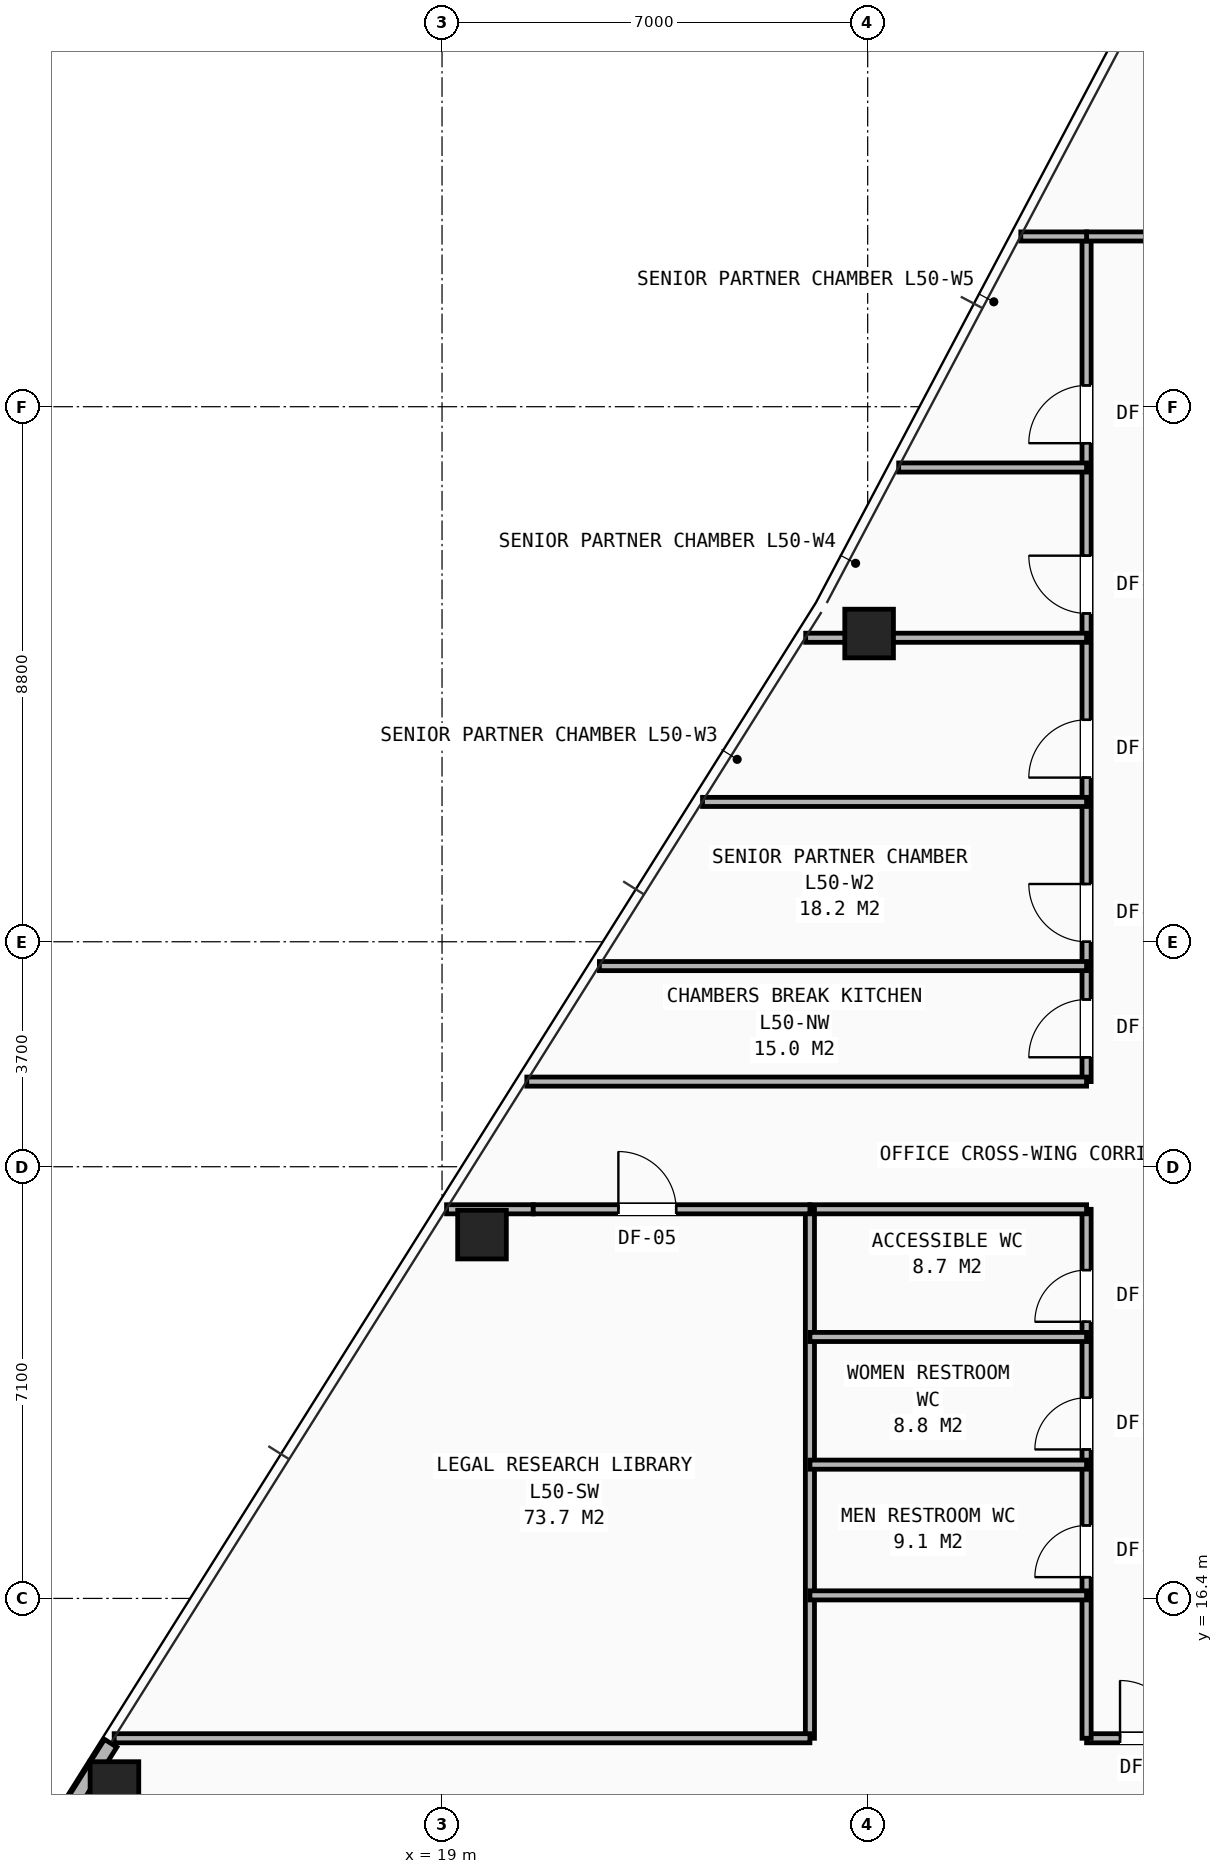
"""IFC4 building model, lengths in metres.
Left out: names, types, materials, properties, quantities, classifications, styles, units other than length and angle.
Written with IfcOpenShell. Run it as: python <this file> out.ifc"""

import sys

from ifc_helpers import new_model, si_unit, direction, frame, frame_2d, origin, origin_2d, place, context, subcontext, project, spatial, rectangle, hollow_rectangle, extrude, element, fill, save


model = new_model("IFC4")
c1 = context("Model", 3, precision=1e-05, world=origin(), true_north=direction((0.0, 1.0)))
c2 = subcontext(c1, "Body", "Model", "MODEL_VIEW")
j1 = project(units=[si_unit("LENGTHUNIT", "METRE"), si_unit("PLANEANGLEUNIT", "RADIAN")], contexts=[c1])
p1 = place(None, origin())
s1 = spatial("IfcSite", under=j1, at=p1, CompositionType="ELEMENT")
p2 = place(p1, origin())
s2 = spatial("IfcBuilding", under=s1, at=p2, CompositionType="ELEMENT")
p3 = place(p2, frame((0.0, 0.0, 175.8)))
s3 = spatial("IfcBuildingStorey", under=s2, at=p3, CompositionType="ELEMENT", Elevation=175.8)
for number, where, z_axis, x_axis in (
    (1, (26.024, 32.269, 0.0), (0.0, 0.0, 1.0), (1.0, 0.0, 0.0)),
    (2, (19.657, 22.384, 0.0), (0.0, 0.0, 1.0), (1.0, 0.0, 0.0)),
    (3, (13.612, 13.314, 0.0), (0.0, 0.0, 1.0), (1.0, 0.0, 0.0)),
):
    element("IfcColumn", number, at=place(p3, frame(where, z_axis=z_axis, x_axis=x_axis)), inside=s3, PredefinedType="COLUMN", context=c2, shape_type="SweptSolid", body=[
        extrude(hollow_rectangle(XDim=0.8, YDim=0.8, WallThickness=0.055, at=origin_2d()), origin(), (0.0, 0.0, 1.0), 3.45),
    ])
p4 = place(p3, frame((13.551, 14.018, 0.0), z_axis=(0.0, 0.0, 1.0), x_axis=(-0.531987132085, -0.846752438022, 0.0)))
e4 = element("IfcWall", 4, at=p4, inside=s3, PredefinedType="SHEAR", context=c2, shape_type="SweptSolid", body=[
    extrude(rectangle(XDim=1.302, YDim=0.24, at=frame_2d((0.651, 0.0))), origin(), (0.0, 0.0, 1.0), 2.583),
])
p5 = place(p3, frame((29.6, 14.1, 0.0), z_axis=(0.0, 0.0, 1.0), x_axis=(1.0, 0.0, 0.0)))
e5 = element("IfcWall", 5, at=p5, inside=s3, PredefinedType="PARTITIONING", context=c2, shape_type="SweptSolid", body=[
    extrude(rectangle(XDim=18.6, YDim=0.15, at=frame_2d((9.3, 0.0))), origin(), (0.0, 0.0, 1.0), 2.252),
])
p6 = place(p5, frame((0.55, 0.0, 0.0)))
e6 = element("IfcOpeningElement", 6, at=p6, cuts=e5, PredefinedType="OPENING", context=c2, shape_type="SweptSolid", body=[
    extrude(rectangle(XDim=0.95, YDim=2.1, at=frame_2d((0.475, 1.05))), frame((0.0, 0.085, 0.0), z_axis=(0.0, -1.0, 0.0), x_axis=(1.0, 0.0, 0.0)), (0.0, 0.0, 1.0), 0.17),
])
p7 = place(p5, frame((2.25, 0.0, 0.0)))
e7 = element("IfcOpeningElement", 7, at=p7, cuts=e5, PredefinedType="OPENING", context=c2, shape_type="SweptSolid", body=[
    extrude(rectangle(XDim=0.95, YDim=2.1, at=frame_2d((0.475, 1.05))), frame((0.0, 0.085, 0.0), z_axis=(0.0, -1.0, 0.0), x_axis=(1.0, 0.0, 0.0)), (0.0, 0.0, 1.0), 0.17),
])
p8 = place(p5, frame((5.95, 0.0, 0.0)))
e8 = element("IfcOpeningElement", 8, at=p8, cuts=e5, PredefinedType="OPENING", context=c2, shape_type="SweptSolid", body=[
    extrude(rectangle(XDim=0.95, YDim=2.1, at=frame_2d((0.475, 1.05))), frame((0.0, 0.085, 0.0), z_axis=(0.0, -1.0, 0.0), x_axis=(1.0, 0.0, 0.0)), (0.0, 0.0, 1.0), 0.17),
])
p9 = place(p5, frame((9.75, 0.0, 0.0)))
e9 = element("IfcOpeningElement", 9, at=p9, cuts=e5, PredefinedType="OPENING", context=c2, shape_type="SweptSolid", body=[
    extrude(rectangle(XDim=0.95, YDim=2.1, at=frame_2d((0.475, 1.05))), frame((0.0, 0.085, 0.0), z_axis=(0.0, -1.0, 0.0), x_axis=(1.0, 0.0, 0.0)), (0.0, 0.0, 1.0), 0.17),
])
p10 = place(p5, frame((13.55, 0.0, 0.0)))
e10 = element("IfcOpeningElement", 10, at=p10, cuts=e5, PredefinedType="OPENING", context=c2, shape_type="SweptSolid", body=[
    extrude(rectangle(XDim=0.95, YDim=2.1, at=frame_2d((0.475, 1.05))), frame((0.0, 0.085, 0.0), z_axis=(0.0, -1.0, 0.0), x_axis=(1.0, 0.0, 0.0)), (0.0, 0.0, 1.0), 0.17),
])
p11 = place(p5, frame((16.95, 0.0, 0.0)))
e11 = element("IfcOpeningElement", 11, at=p11, cuts=e5, PredefinedType="OPENING", context=c2, shape_type="SweptSolid", body=[
    extrude(rectangle(XDim=0.95, YDim=2.1, at=frame_2d((0.475, 1.05))), frame((0.0, 0.085, 0.0), z_axis=(0.0, -1.0, 0.0), x_axis=(1.0, 0.0, 0.0)), (0.0, 0.0, 1.0), 0.17),
])
p12 = place(p3, frame((29.6, 14.1, 0.0), z_axis=(0.0, 0.0, 1.0), x_axis=(0.0, 1.0, 0.0)))
e12 = element("IfcWall", 12, at=p12, inside=s3, PredefinedType="PARTITIONING", context=c2, shape_type="SweptSolid", body=[
    extrude(rectangle(XDim=8.7, YDim=0.15, at=frame_2d((4.35, 0.0))), origin(), (0.0, 0.0, 1.0), 3.21),
])
p13 = place(p12, frame((2.65, 0.0, 0.0)))
e13 = element("IfcOpeningElement", 13, at=p13, cuts=e12, PredefinedType="OPENING", context=c2, shape_type="SweptSolid", body=[
    extrude(rectangle(XDim=0.85, YDim=2.05, at=frame_2d((0.425, 1.025))), frame((0.0, 0.085, 0.0), z_axis=(0.0, -1.0, 0.0), x_axis=(1.0, 0.0, 0.0)), (0.0, 0.0, 1.0), 0.17),
])
p14 = place(p12, frame((4.75, 0.0, 0.0)))
e14 = element("IfcOpeningElement", 14, at=p14, cuts=e12, PredefinedType="OPENING", context=c2, shape_type="SweptSolid", body=[
    extrude(rectangle(XDim=0.85, YDim=2.05, at=frame_2d((0.425, 1.025))), frame((0.0, 0.085, 0.0), z_axis=(0.0, -1.0, 0.0), x_axis=(1.0, 0.0, 0.0)), (0.0, 0.0, 1.0), 0.17),
])
p15 = place(p12, frame((6.85, 0.0, 0.0)))
e15 = element("IfcOpeningElement", 15, at=p15, cuts=e12, PredefinedType="OPENING", context=c2, shape_type="SweptSolid", body=[
    extrude(rectangle(XDim=0.85, YDim=2.05, at=frame_2d((0.425, 1.025))), frame((0.0, 0.085, 0.0), z_axis=(0.0, -1.0, 0.0), x_axis=(1.0, 0.0, 0.0)), (0.0, 0.0, 1.0), 0.17),
])
p16 = place(p3, frame((29.6, 24.9, 0.0), z_axis=(0.0, 0.0, 1.0), x_axis=(0.0, 1.0, 0.0)))
e16 = element("IfcWall", 16, at=p16, inside=s3, PredefinedType="PARTITIONING", context=c2, shape_type="SweptSolid", body=[
    extrude(rectangle(XDim=13.9, YDim=0.15, at=frame_2d((6.95, 0.0))), origin(), (0.0, 0.0, 1.0), 2.252),
])
p17 = place(p16, frame((0.4, 0.0, 0.0)))
e17 = element("IfcOpeningElement", 17, at=p17, cuts=e16, PredefinedType="OPENING", context=c2, shape_type="SweptSolid", body=[
    extrude(rectangle(XDim=0.95, YDim=2.1, at=frame_2d((0.475, 1.05))), frame((0.0, 0.085, 0.0), z_axis=(0.0, -1.0, 0.0), x_axis=(1.0, 0.0, 0.0)), (0.0, 0.0, 1.0), 0.17),
])
p18 = place(p16, frame((2.3, 0.0, 0.0)))
e18 = element("IfcOpeningElement", 18, at=p18, cuts=e16, PredefinedType="OPENING", context=c2, shape_type="SweptSolid", body=[
    extrude(rectangle(XDim=0.95, YDim=2.1, at=frame_2d((0.475, 1.05))), frame((0.0, 0.085, 0.0), z_axis=(0.0, -1.0, 0.0), x_axis=(1.0, 0.0, 0.0)), (0.0, 0.0, 1.0), 0.17),
])
p19 = place(p16, frame((5.0, 0.0, 0.0)))
e19 = element("IfcOpeningElement", 19, at=p19, cuts=e16, PredefinedType="OPENING", context=c2, shape_type="SweptSolid", body=[
    extrude(rectangle(XDim=0.95, YDim=2.1, at=frame_2d((0.475, 1.05))), frame((0.0, 0.085, 0.0), z_axis=(0.0, -1.0, 0.0), x_axis=(1.0, 0.0, 0.0)), (0.0, 0.0, 1.0), 0.17),
])
p20 = place(p16, frame((7.7, 0.0, 0.0)))
e20 = element("IfcOpeningElement", 20, at=p20, cuts=e16, PredefinedType="OPENING", context=c2, shape_type="SweptSolid", body=[
    extrude(rectangle(XDim=0.95, YDim=2.1, at=frame_2d((0.475, 1.05))), frame((0.0, 0.085, 0.0), z_axis=(0.0, -1.0, 0.0), x_axis=(1.0, 0.0, 0.0)), (0.0, 0.0, 1.0), 0.17),
])
p21 = place(p16, frame((10.5, 0.0, 0.0)))
e21 = element("IfcOpeningElement", 21, at=p21, cuts=e16, PredefinedType="OPENING", context=c2, shape_type="SweptSolid", body=[
    extrude(rectangle(XDim=0.95, YDim=2.1, at=frame_2d((0.475, 1.05))), frame((0.0, 0.085, 0.0), z_axis=(0.0, -1.0, 0.0), x_axis=(1.0, 0.0, 0.0)), (0.0, 0.0, 1.0), 0.17),
])
p22 = place(p3, frame((29.6, 38.8, 0.0), z_axis=(0.0, 0.0, 1.0), x_axis=(1.0, 0.0, 0.0)))
e22 = element("IfcWall", 22, at=p22, inside=s3, PredefinedType="PARTITIONING", context=c2, shape_type="SweptSolid", body=[
    extrude(rectangle(XDim=2.2, YDim=0.15, at=frame_2d((1.1, 0.0))), origin(), (0.0, 0.0, 1.0), 2.589),
])
p23 = place(p3, frame((19.074, 22.8, 0.0), z_axis=(0.0, 0.0, 1.0), x_axis=(1.0, 0.0, 0.0)))
e23 = element("IfcWall", 23, at=p23, inside=s3, PredefinedType="PARTITIONING", context=c2, shape_type="SweptSolid", body=[
    extrude(rectangle(XDim=1.426, YDim=0.15, at=frame_2d((0.713, 0.0))), origin(), (0.0, 0.0, 1.0), 2.589),
])
p24 = place(p3, frame((25.05, 22.8, 0.0), z_axis=(0.0, 0.0, 1.0), x_axis=(1.0, 0.0, 0.0)))
e24 = element("IfcWall", 24, at=p24, inside=s3, PredefinedType="PARTITIONING", context=c2, shape_type="SweptSolid", body=[
    extrude(rectangle(XDim=4.55, YDim=0.15, at=frame_2d((2.275, 0.0))), origin(), (0.0, 0.0, 1.0), 3.21),
])
p25 = place(p3, frame((20.394, 24.9, 0.0), z_axis=(0.0, 0.0, 1.0), x_axis=(1.0, 0.0, 0.0)))
e25 = element("IfcWall", 25, at=p25, inside=s3, PredefinedType="PARTITIONING", context=c2, shape_type="SweptSolid", body=[
    extrude(rectangle(XDim=9.206, YDim=0.15, at=frame_2d((4.603, 0.0))), origin(), (0.0, 0.0, 1.0), 2.589),
])
p26 = place(p3, frame((25.05, 14.1, 0.0), z_axis=(0.0, 0.0, 1.0), x_axis=(0.0, 1.0, 0.0)))
e26 = element("IfcWall", 26, at=p26, inside=s3, PredefinedType="PARTITIONING", context=c2, shape_type="SweptSolid", body=[
    extrude(rectangle(XDim=8.7, YDim=0.15, at=frame_2d((4.35, 0.0))), origin(), (0.0, 0.0, 1.0), 3.21),
])
for number, where, z_axis, x_axis in (
    (27, (25.05, 16.45, 0.0), (0.0, 0.0, 1.0), (1.0, 0.0, 0.0)),
    (28, (25.05, 18.6, 0.0), (0.0, 0.0, 1.0), (1.0, 0.0, 0.0)),
    (29, (25.05, 20.7, 0.0), (0.0, 0.0, 1.0), (1.0, 0.0, 0.0)),
):
    element("IfcWall", number, at=place(p3, frame(where, z_axis=z_axis, x_axis=x_axis)), inside=s3, PredefinedType="PARTITIONING", context=c2, shape_type="SweptSolid", body=[
        extrude(rectangle(XDim=4.55, YDim=0.15, at=frame_2d((2.275, 0.0))), origin(), (0.0, 0.0, 1.0), 3.21),
    ])
p27 = place(p3, frame((13.608, 14.1, 0.0), z_axis=(0.0, 0.0, 1.0), x_axis=(1.0, 0.0, 0.0)))
e30 = element("IfcWall", 30, at=p27, inside=s3, PredefinedType="PARTITIONING", context=c2, shape_type="SweptSolid", body=[
    extrude(rectangle(XDim=11.442, YDim=0.15, at=frame_2d((5.721, 0.0))), origin(), (0.0, 0.0, 1.0), 2.589),
])
p28 = place(p3, frame((20.5, 22.8, 0.0), z_axis=(0.0, 0.0, 1.0), x_axis=(1.0, 0.0, 0.0)))
e31 = element("IfcWall", 31, at=p28, inside=s3, PredefinedType="PARTITIONING", context=c2, shape_type="SweptSolid", body=[
    extrude(rectangle(XDim=4.55, YDim=0.15, at=frame_2d((2.275, 0.0))), origin(), (0.0, 0.0, 1.0), 3.21),
])
p29 = place(p28, frame((1.4, 0.0, 0.0)))
e32 = element("IfcOpeningElement", 32, at=p29, cuts=e31, PredefinedType="OPENING", context=c2, shape_type="SweptSolid", body=[
    extrude(rectangle(XDim=0.95, YDim=2.1, at=frame_2d((0.475, 1.05))), frame((0.0, 0.085, 0.0), z_axis=(0.0, -1.0, 0.0), x_axis=(1.0, 0.0, 0.0)), (0.0, 0.0, 1.0), 0.17),
])
p30 = place(p3, frame((28.518, 38.8, 0.0), z_axis=(0.0, 0.0, 1.0), x_axis=(1.0, 0.0, 0.0)))
e33 = element("IfcWall", 33, at=p30, inside=s3, PredefinedType="PARTITIONING", context=c2, shape_type="SweptSolid", body=[
    extrude(rectangle(XDim=1.082, YDim=0.15, at=frame_2d((0.541, 0.0))), origin(), (0.0, 0.0, 1.0), 2.589),
])
p31 = place(p3, frame((21.588, 26.8, 0.0), z_axis=(0.0, 0.0, 1.0), x_axis=(1.0, 0.0, 0.0)))
e34 = element("IfcWall", 34, at=p31, inside=s3, PredefinedType="PARTITIONING", context=c2, shape_type="SweptSolid", body=[
    extrude(rectangle(XDim=8.012, YDim=0.15, at=frame_2d((4.006, 0.0))), origin(), (0.0, 0.0, 1.0), 2.589),
])
p32 = place(p3, frame((23.284, 29.5, 0.0), z_axis=(0.0, 0.0, 1.0), x_axis=(1.0, 0.0, 0.0)))
e35 = element("IfcWall", 35, at=p32, inside=s3, PredefinedType="PARTITIONING", context=c2, shape_type="SweptSolid", body=[
    extrude(rectangle(XDim=6.316, YDim=0.15, at=frame_2d((3.158, 0.0))), origin(), (0.0, 0.0, 1.0), 2.589),
])
p33 = place(p3, frame((24.981, 32.2, 0.0), z_axis=(0.0, 0.0, 1.0), x_axis=(1.0, 0.0, 0.0)))
e36 = element("IfcWall", 36, at=p33, inside=s3, PredefinedType="PARTITIONING", context=c2, shape_type="SweptSolid", body=[
    extrude(rectangle(XDim=4.619, YDim=0.15, at=frame_2d((2.31, 0.0))), origin(), (0.0, 0.0, 1.0), 2.252),
])
p34 = place(p3, frame((26.51, 35.0, 0.0), z_axis=(0.0, 0.0, 1.0), x_axis=(1.0, 0.0, 0.0)))
e37 = element("IfcWall", 37, at=p34, inside=s3, PredefinedType="PARTITIONING", context=c2, shape_type="SweptSolid", body=[
    extrude(rectangle(XDim=3.09, YDim=0.15, at=frame_2d((1.545, 0.0))), origin(), (0.0, 0.0, 1.0), 2.589),
])
p35 = place(p13, origin())
e38 = element("IfcDoor", 38, at=p35, inside=s3, OperationType="SINGLE_SWING_LEFT", PredefinedType="DOOR", context=c2, shape_type="SweptSolid", body=[
    extrude(rectangle(XDim=0.85, YDim=2.05, at=frame_2d((0.425, 1.025))), frame((0.0, 0.025, 0.0), z_axis=(0.0, -1.0, 0.0), x_axis=(1.0, 0.0, 0.0)), (0.0, 0.0, 1.0), 0.05),
])
fill(e13, e38)
p36 = place(p14, origin())
e39 = element("IfcDoor", 39, at=p36, inside=s3, OperationType="SINGLE_SWING_LEFT", PredefinedType="DOOR", context=c2, shape_type="SweptSolid", body=[
    extrude(rectangle(XDim=0.85, YDim=2.05, at=frame_2d((0.425, 1.025))), frame((0.0, 0.025, 0.0), z_axis=(0.0, -1.0, 0.0), x_axis=(1.0, 0.0, 0.0)), (0.0, 0.0, 1.0), 0.05),
])
fill(e14, e39)
p37 = place(p15, origin())
e40 = element("IfcDoor", 40, at=p37, inside=s3, OperationType="SINGLE_SWING_LEFT", PredefinedType="DOOR", context=c2, shape_type="SweptSolid", body=[
    extrude(rectangle(XDim=0.85, YDim=2.05, at=frame_2d((0.425, 1.025))), frame((0.0, 0.025, 0.0), z_axis=(0.0, -1.0, 0.0), x_axis=(1.0, 0.0, 0.0)), (0.0, 0.0, 1.0), 0.05),
])
fill(e15, e40)
p38 = place(p6, origin())
e41 = element("IfcDoor", 41, at=p38, inside=s3, OperationType="SINGLE_SWING_LEFT", PredefinedType="DOOR", context=c2, shape_type="SweptSolid", body=[
    extrude(rectangle(XDim=0.95, YDim=2.1, at=frame_2d((0.475, 1.05))), frame((0.0, 0.025, 0.0), z_axis=(0.0, -1.0, 0.0), x_axis=(1.0, 0.0, 0.0)), (0.0, 0.0, 1.0), 0.05),
])
fill(e6, e41)
p39 = place(p29, origin())
e42 = element("IfcDoor", 42, at=p39, inside=s3, OperationType="SINGLE_SWING_LEFT", PredefinedType="DOOR", context=c2, shape_type="SweptSolid", body=[
    extrude(rectangle(XDim=0.95, YDim=2.1, at=frame_2d((0.475, 1.05))), frame((0.0, 0.025, 0.0), z_axis=(0.0, -1.0, 0.0), x_axis=(1.0, 0.0, 0.0)), (0.0, 0.0, 1.0), 0.05),
])
fill(e32, e42)
p40 = place(p17, origin())
e43 = element("IfcDoor", 43, at=p40, inside=s3, OperationType="SINGLE_SWING_LEFT", PredefinedType="DOOR", context=c2, shape_type="SweptSolid", body=[
    extrude(rectangle(XDim=0.95, YDim=2.1, at=frame_2d((0.475, 1.05))), frame((0.0, 0.025, 0.0), z_axis=(0.0, -1.0, 0.0), x_axis=(1.0, 0.0, 0.0)), (0.0, 0.0, 1.0), 0.05),
])
fill(e17, e43)
p41 = place(p18, origin())
e44 = element("IfcDoor", 44, at=p41, inside=s3, OperationType="SINGLE_SWING_RIGHT", PredefinedType="DOOR", context=c2, shape_type="SweptSolid", body=[
    extrude(rectangle(XDim=0.95, YDim=2.1, at=frame_2d((0.475, 1.05))), frame((0.0, 0.025, 0.0), z_axis=(0.0, -1.0, 0.0), x_axis=(1.0, 0.0, 0.0)), (0.0, 0.0, 1.0), 0.05),
])
fill(e18, e44)
p42 = place(p19, origin())
e45 = element("IfcDoor", 45, at=p42, inside=s3, OperationType="SINGLE_SWING_LEFT", PredefinedType="DOOR", context=c2, shape_type="SweptSolid", body=[
    extrude(rectangle(XDim=0.95, YDim=2.1, at=frame_2d((0.475, 1.05))), frame((0.0, 0.025, 0.0), z_axis=(0.0, -1.0, 0.0), x_axis=(1.0, 0.0, 0.0)), (0.0, 0.0, 1.0), 0.05),
])
fill(e19, e45)
p43 = place(p20, origin())
e46 = element("IfcDoor", 46, at=p43, inside=s3, OperationType="SINGLE_SWING_RIGHT", PredefinedType="DOOR", context=c2, shape_type="SweptSolid", body=[
    extrude(rectangle(XDim=0.95, YDim=2.1, at=frame_2d((0.475, 1.05))), frame((0.0, 0.025, 0.0), z_axis=(0.0, -1.0, 0.0), x_axis=(1.0, 0.0, 0.0)), (0.0, 0.0, 1.0), 0.05),
])
fill(e20, e46)
p44 = place(p21, origin())
e47 = element("IfcDoor", 47, at=p44, inside=s3, OperationType="SINGLE_SWING_LEFT", PredefinedType="DOOR", context=c2, shape_type="SweptSolid", body=[
    extrude(rectangle(XDim=0.95, YDim=2.1, at=frame_2d((0.475, 1.05))), frame((0.0, 0.025, 0.0), z_axis=(0.0, -1.0, 0.0), x_axis=(1.0, 0.0, 0.0)), (0.0, 0.0, 1.0), 0.05),
])
fill(e21, e47)
save(model, sys.argv[1])
